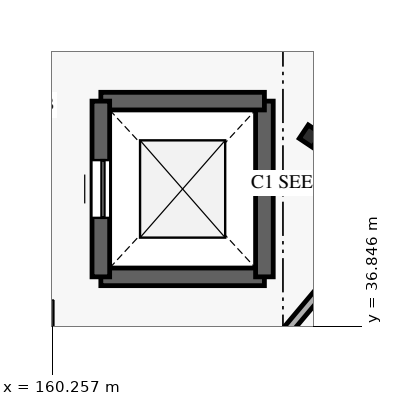
"""IFC4 building model, lengths in metres.
Left out: names, types, materials, properties, quantities, classifications, styles, units other than length and angle.
Written with IfcOpenShell. Run it as: python <this file> out.ifc"""

import sys

from ifc_helpers import new_model, si_unit, direction, frame, frame_2d, origin, origin_2d, place, context, subcontext, project, spatial, rectangle, i_section, extrude, element, fill, save


model = new_model("IFC4")
c1 = context("Model", 3, precision=1e-05, world=origin(), true_north=direction((0.0, 1.0)))
c2 = subcontext(c1, "Body", "Model", "MODEL_VIEW")
j1 = project(units=[si_unit("LENGTHUNIT", "METRE"), si_unit("PLANEANGLEUNIT", "RADIAN")], contexts=[c1])
p1 = place(None, origin())
s1 = spatial("IfcSite", under=j1, at=p1, CompositionType="ELEMENT")
p2 = place(p1, origin())
s2 = spatial("IfcBuilding", under=s1, at=p2, CompositionType="ELEMENT")
p3 = place(p2, frame((0.0, 0.0, 8.4)))
s3 = spatial("IfcBuildingStorey", under=s2, at=p3, CompositionType="ELEMENT", Elevation=8.4)
p4 = place(p3, frame((164.5, 39.97, 0.0), z_axis=(0.0, 0.0, 1.0), x_axis=(-0.831469612303, 0.55557023302, 0.0)))
e1 = element("IfcColumn", 1, at=p4, inside=s3, PredefinedType="COLUMN", context=c2, shape_type="SweptSolid", body=[
    extrude(i_section(OverallWidth=0.259, OverallDepth=0.267, WebThickness=0.013, FlangeThickness=0.021, FilletRadius=0.013, at=origin_2d()), origin(), (0.0, 0.0, 1.0), 4.2),
])
p5 = place(p3, frame((161.055, 37.655, 0.0), z_axis=(0.0, 0.0, 1.0), x_axis=(1.0, 0.0, 0.0)))
e2 = element("IfcWall", 2, at=p5, inside=s3, PredefinedType="SHEAR", context=c2, shape_type="SweptSolid", body=[
    extrude(rectangle(XDim=2.69, YDim=0.29, at=frame_2d((1.345, 0.0))), origin(), (0.0, 0.0, 1.0), 3.95),
])
p6 = place(p3, frame((163.745, 37.655, 0.0), z_axis=(0.0, 0.0, 1.0), x_axis=(0.0, 1.0, 0.0)))
e3 = element("IfcWall", 3, at=p6, inside=s3, PredefinedType="SHEAR", context=c2, shape_type="SweptSolid", body=[
    extrude(rectangle(XDim=2.89, YDim=0.29, at=frame_2d((1.445, 0.0))), origin(), (0.0, 0.0, 1.0), 3.95),
])
p7 = place(p3, frame((163.745, 40.545, 0.0), z_axis=(0.0, 0.0, 1.0), x_axis=(-1.0, 0.0, 0.0)))
e4 = element("IfcWall", 4, at=p7, inside=s3, PredefinedType="SHEAR", context=c2, shape_type="SweptSolid", body=[
    extrude(rectangle(XDim=2.69, YDim=0.29, at=frame_2d((1.345, 0.0))), origin(), (0.0, 0.0, 1.0), 3.95),
])
p8 = place(p3, frame((161.055, 40.545, 0.0), z_axis=(0.0, 0.0, 1.0), x_axis=(0.0, -1.0, 0.0)))
e5 = element("IfcWall", 5, at=p8, inside=s3, PredefinedType="SHEAR", context=c2, shape_type="SweptSolid", body=[
    extrude(rectangle(XDim=2.89, YDim=0.29, at=frame_2d((1.445, 0.0))), origin(), (0.0, 0.0, 1.0), 3.95),
])
p9 = place(p8, frame((0.97, 0.0, 0.0)))
e6 = element("IfcOpeningElement", 6, at=p9, cuts=e5, PredefinedType="OPENING", context=c2, shape_type="SweptSolid", body=[
    extrude(rectangle(XDim=0.95, YDim=2.1, at=frame_2d((0.475, 1.05))), frame((0.0, 0.155, 0.0), z_axis=(0.0, -1.0, 0.0), x_axis=(1.0, 0.0, 0.0)), (0.0, 0.0, 1.0), 0.31),
])
p10 = place(p3, frame((169.053, 42.652, 0.0), z_axis=(0.0, 0.0, 1.0), x_axis=(-0.642787139762, -0.766044837432, 0.0)))
e7 = element("IfcWall", 7, at=p10, inside=s3, PredefinedType="PARTITIONING", context=c2, shape_type="SweptSolid", body=[
    extrude(rectangle(XDim=12.53, YDim=0.15, at=frame_2d((6.265, 0.0))), origin(), (0.0, 0.0, 1.0), 3.915),
])
p11 = place(p10, frame((4.092, 0.0, 0.0)))
e8 = element("IfcOpeningElement", 8, at=p11, cuts=e7, PredefinedType="OPENING", context=c2, shape_type="SweptSolid", body=[
    extrude(rectangle(XDim=0.84, YDim=2.04, at=frame_2d((0.42, 1.02))), frame((0.0, 0.085, 0.0), z_axis=(0.0, -1.0, 0.0), x_axis=(1.0, 0.0, 0.0)), (0.0, 0.0, 1.0), 0.17),
])
p12 = place(p9, frame((0.95, 0.0, 0.0), z_axis=(0.0, 0.0, 1.0), x_axis=(-1.0, 0.0, 0.0)))
e9 = element("IfcDoor", 9, at=p12, inside=s3, OperationType="SLIDING_TO_LEFT", PredefinedType="DOOR", context=c2, shape_type="SweptSolid", body=[
    extrude(rectangle(XDim=0.95, YDim=2.1, at=frame_2d((0.475, 1.05))), frame((0.0, 0.025, 0.0), z_axis=(0.0, -1.0, 0.0), x_axis=(1.0, 0.0, 0.0)), (0.0, 0.0, 1.0), 0.05),
])
fill(e6, e9)
save(model, sys.argv[1])
